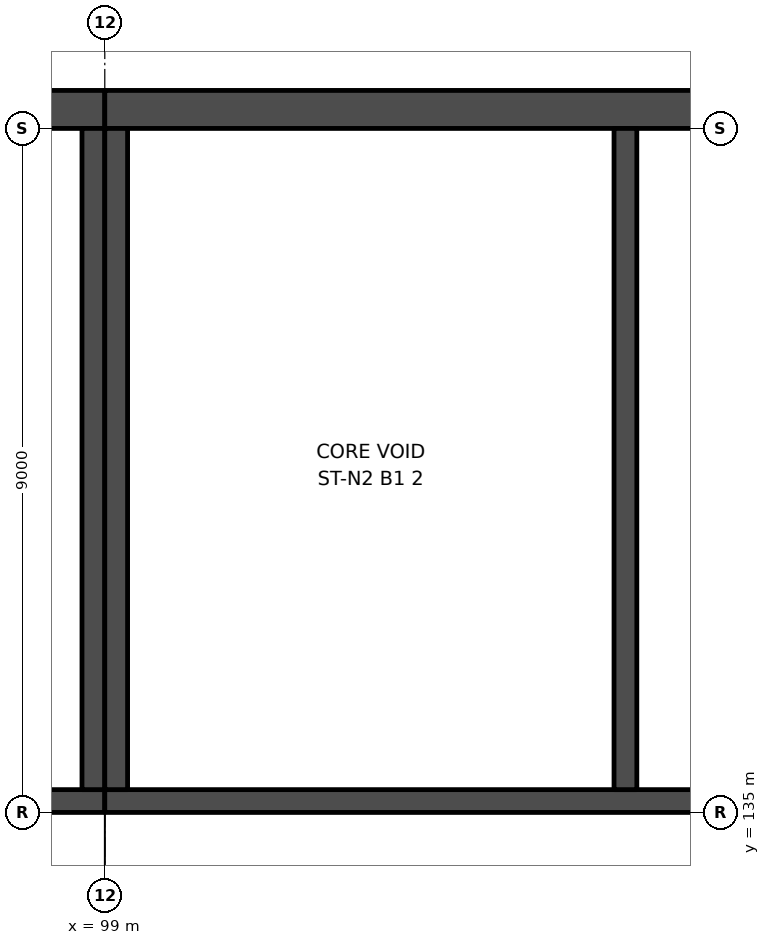
"""IFC4 building model, lengths in metres.
Left out: names, types, materials, properties, quantities, classifications, styles, units other than length and angle.
Written with IfcOpenShell. Run it as: python <this file> out.ifc"""

import sys

from ifc_helpers import new_model, si_unit, direction, frame, frame_2d, origin, place, context, subcontext, project, spatial, rectangle, extrude, element, save


model = new_model("IFC4")
c1 = context("Model", 3, precision=1e-05, world=origin(), true_north=direction((0.0, 1.0)))
c2 = subcontext(c1, "Body", "Model", "MODEL_VIEW")
j1 = project(units=[si_unit("LENGTHUNIT", "METRE"), si_unit("PLANEANGLEUNIT", "RADIAN")], contexts=[c1])
p1 = place(None, origin())
s1 = spatial("IfcSite", under=j1, at=p1, CompositionType="ELEMENT")
p2 = place(p1, origin())
s2 = spatial("IfcBuilding", under=s1, at=p2, CompositionType="ELEMENT")
p3 = place(p2, frame((0.0, 0.0, -6.0)))
s3 = spatial("IfcBuildingStorey", under=s2, at=p3, CompositionType="ELEMENT", Elevation=-6.0)
p4 = place(p3, frame((81.0, 135.15, 0.0), z_axis=(0.0, 0.0, 1.0), x_axis=(1.0, 0.0, 0.0)))
e1 = element("IfcWall", 1, at=p4, inside=s3, PredefinedType="SHEAR", context=c2, shape_type="SweptSolid", body=[
    extrude(rectangle(XDim=18.0, YDim=0.3, at=frame_2d((9.0, 0.0))), origin(), (0.0, 0.0, 1.0), 6.0),
])
p5 = place(p3, frame((81.0, 144.25, 0.0), z_axis=(0.0, 0.0, 1.0), x_axis=(1.0, 0.0, 0.0)))
e2 = element("IfcWall", 2, at=p5, inside=s3, PredefinedType="SHEAR", context=c2, shape_type="SweptSolid", body=[
    extrude(rectangle(XDim=18.0, YDim=0.5, at=frame_2d((9.0, 0.0))), origin(), (0.0, 0.0, 1.0), 6.0),
])
p6 = place(p3, frame((98.85, 135.3, 0.0), z_axis=(0.0, 0.0, 1.0), x_axis=(0.0, 1.0, 0.0)))
e3 = element("IfcWall", 3, at=p6, inside=s3, PredefinedType="SHEAR", context=c2, shape_type="SweptSolid", body=[
    extrude(rectangle(XDim=8.7, YDim=0.3, at=frame_2d((4.35, 0.0))), origin(), (0.0, 0.0, 1.0), 6.0),
])
p7 = place(p3, frame((117.0, 135.15, 0.0), z_axis=(0.0, 0.0, 1.0), x_axis=(-1.0, 0.0, 0.0)))
e4 = element("IfcWall", 4, at=p7, inside=s3, PredefinedType="SHEAR", context=c2, shape_type="SweptSolid", body=[
    extrude(rectangle(XDim=18.0, YDim=0.3, at=frame_2d((9.0, 0.0))), origin(), (0.0, 0.0, 1.0), 6.0),
])
p8 = place(p7, frame((1.5, 0.0, 0.0)))
e5 = element("IfcOpeningElement", 5, at=p8, cuts=e4, PredefinedType="OPENING", context=c2, shape_type="SweptSolid", body=[
    extrude(rectangle(XDim=1.2, YDim=2.1, at=frame_2d((0.6, 1.05))), frame((0.0, 0.16, 0.0), z_axis=(0.0, -1.0, 0.0), x_axis=(1.0, 0.0, 0.0)), (0.0, 0.0, 1.0), 0.32),
])
p9 = place(p3, frame((117.0, 144.25, 0.0), z_axis=(0.0, 0.0, 1.0), x_axis=(-1.0, 0.0, 0.0)))
e6 = element("IfcWall", 6, at=p9, inside=s3, PredefinedType="SHEAR", context=c2, shape_type="SweptSolid", body=[
    extrude(rectangle(XDim=18.0, YDim=0.5, at=frame_2d((9.0, 0.0))), origin(), (0.0, 0.0, 1.0), 6.0),
])
for number, where, z_axis, x_axis in (
    (7, (99.15, 135.3, 0.0), (0.0, 0.0, 1.0), (0.0, 1.0, 0.0)),
    (8, (105.85, 135.3, 0.0), (0.0, 0.0, 1.0), (0.0, 1.0, 0.0)),
):
    element("IfcWall", number, at=place(p3, frame(where, z_axis=z_axis, x_axis=x_axis)), inside=s3, PredefinedType="SHEAR", context=c2, shape_type="SweptSolid", body=[
        extrude(rectangle(XDim=8.7, YDim=0.3, at=frame_2d((4.35, 0.0))), origin(), (0.0, 0.0, 1.0), 6.0),
    ])
save(model, sys.argv[1])
